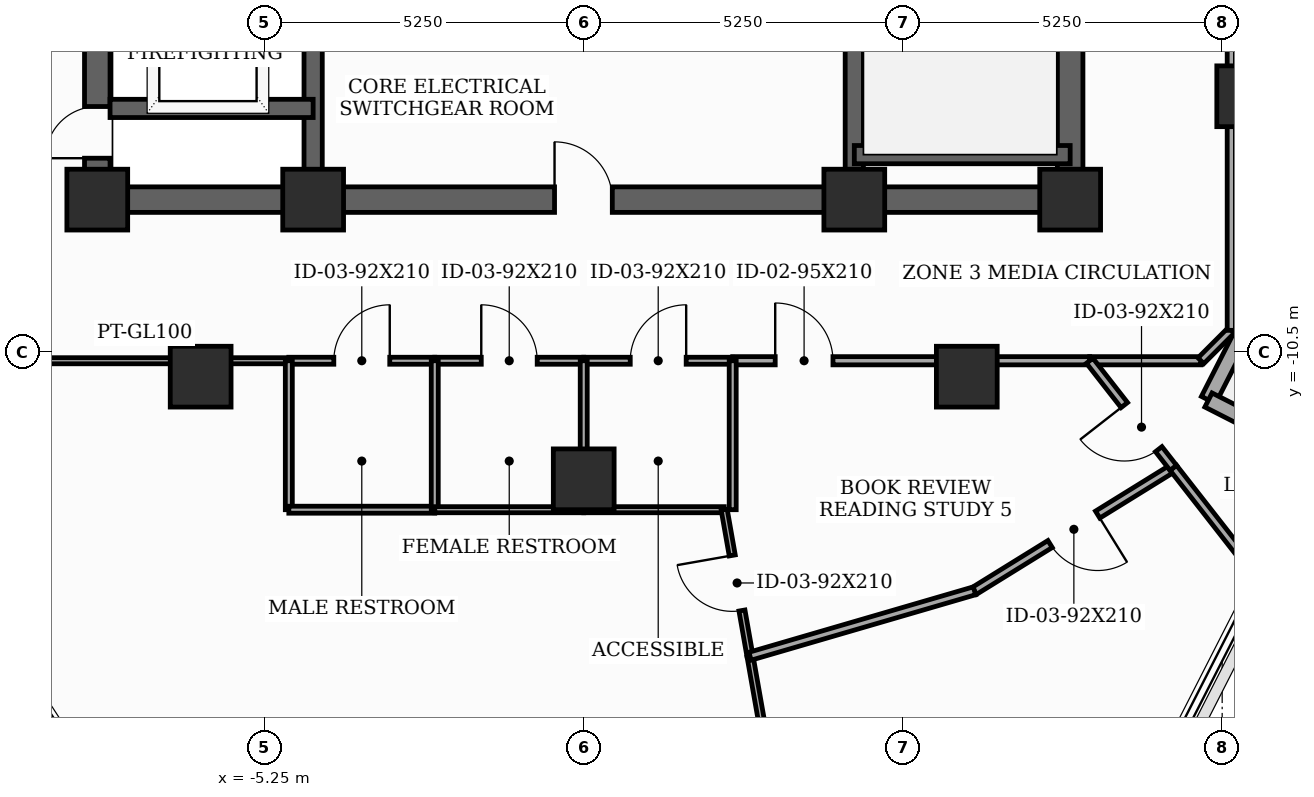
"""IFC4 building model, lengths in metres.
Left out: names, types, materials, properties, quantities, classifications, styles, units other than length and angle.
Written with IfcOpenShell. Run it as: python <this file> out.ifc"""

import sys

from ifc_helpers import new_model, si_unit, direction, frame, frame_2d, origin, origin_2d, place, context, subcontext, project, spatial, rectangle, extrude, element, fill, save


model = new_model("IFC4")
c1 = context("Model", 3, precision=1e-05, world=origin(), true_north=direction((0.0, 1.0)))
c2 = subcontext(c1, "Body", "Model", "MODEL_VIEW")
j1 = project(units=[si_unit("LENGTHUNIT", "METRE"), si_unit("PLANEANGLEUNIT", "RADIAN")], contexts=[c1])
p1 = place(None, origin())
s1 = spatial("IfcSite", under=j1, at=p1, CompositionType="ELEMENT")
p2 = place(p1, origin())
s2 = spatial("IfcBuilding", under=s1, at=p2, CompositionType="ELEMENT")
p3 = place(p2, frame((0.0, 0.0, 252.2)))
s3 = spatial("IfcBuildingStorey", under=s2, at=p3, CompositionType="ELEMENT", Elevation=252.2)
for number, where, z_axis, x_axis in (
    (1, (-8.0, -8.0, 0.0), (0.0, 0.0, 1.0), (1.0, 0.0, 0.0)),
    (2, (-4.45, -8.0, 0.0), (0.0, 0.0, 1.0), (1.0, 0.0, 0.0)),
    (3, (4.45, -8.0, 0.0), (0.0, 0.0, 1.0), (1.0, 0.0, 0.0)),
    (4, (8.0, -8.0, 0.0), (0.0, 0.0, 1.0), (1.0, 0.0, 0.0)),
    (5, (-6.3, -10.912, 0.0), (0.0, 0.0, 1.0), (1.0, 0.0, 0.0)),
    (6, (0.0, -12.6, 0.0), (0.0, 0.0, 1.0), (1.0, 0.0, 0.0)),
    (7, (6.3, -10.912, 0.0), (0.0, 0.0, 1.0), (1.0, 0.0, 0.0)),
    (8, (10.912, -6.3, 0.0), (0.0, 0.0, 1.0), (1.0, 0.0, 0.0)),
):
    element("IfcColumn", number, at=place(p3, frame(where, z_axis=z_axis, x_axis=x_axis)), inside=s3, PredefinedType="COLUMN", context=c2, shape_type="SweptSolid", body=[
        extrude(rectangle(XDim=1.0, YDim=1.0, at=origin_2d()), origin(), (0.0, 0.0, 1.0), 3.7),
    ])
p4 = place(p3, frame((10.274, -11.296, 0.0), z_axis=(0.0, 0.0, 1.0), x_axis=(0.453991476178, 0.891006026667, 0.0)))
e9 = element("IfcWall", 9, at=p4, inside=s3, PredefinedType="SOLIDWALL", context=c2, shape_type="SweptSolid", body=[
    extrude(rectangle(XDim=10.8, YDim=0.26, at=frame_2d((5.4, 0.0))), origin(), (0.0, 0.0, 1.0), 3.5),
])
p5 = place(p4, frame((3.2, 0.0, 0.0)))
e10 = element("IfcOpeningElement", 10, at=p5, cuts=e9, PredefinedType="OPENING", context=c2, shape_type="SweptSolid", body=[
    extrude(rectangle(XDim=1.6, YDim=2.08, at=frame_2d((0.8, 1.04))), frame((0.0, 0.14, 0.0), z_axis=(0.0, -1.0, 0.0), x_axis=(1.0, 0.0, 0.0)), (0.0, 0.0, 1.0), 0.28),
])
p6 = place(p4, frame((5.65, 0.0, 0.85)))
e11 = element("IfcOpeningElement", 11, at=p6, cuts=e9, PredefinedType="OPENING", context=c2, shape_type="SweptSolid", body=[
    extrude(rectangle(XDim=1.3, YDim=1.25, at=frame_2d((0.65, 0.625))), frame((0.0, 0.14, 0.0), z_axis=(0.0, -1.0, 0.0), x_axis=(1.0, 0.0, 0.0)), (0.0, 0.0, 1.0), 0.28),
])
p7 = place(p3, frame((12.19, -12.272, 0.0), z_axis=(0.0, 0.0, 1.0), x_axis=(-0.890994427822, 0.454014239413, 0.0)))
e12 = element("IfcWall", 12, at=p7, inside=s3, PredefinedType="SOLIDWALL", context=c2, shape_type="SweptSolid", body=[
    extrude(rectangle(XDim=2.15, YDim=0.26, at=frame_2d((1.075, 0.0))), origin(), (0.0, 0.0, 1.0), 3.5),
])
p8 = place(p3, frame((-8.0, -8.0, 0.0), z_axis=(0.0, 0.0, 1.0), x_axis=(0.0, 1.0, 0.0)))
e13 = element("IfcWall", 13, at=p8, inside=s3, PredefinedType="SHEAR", context=c2, shape_type="SweptSolid", body=[
    extrude(rectangle(XDim=16.0, YDim=0.42, at=frame_2d((8.0, 0.0))), origin(), (0.0, 0.0, 1.0), 3.5),
])
p9 = place(p8, frame((0.681, 0.0, 0.0)))
e14 = element("IfcOpeningElement", 14, at=p9, cuts=e13, PredefinedType="OPENING", context=c2, shape_type="SweptSolid", body=[
    extrude(rectangle(XDim=0.85, YDim=2.02, at=frame_2d((0.425, 1.01))), frame((0.0, 0.22, 0.0), z_axis=(0.0, -1.0, 0.0), x_axis=(1.0, 0.0, 0.0)), (0.0, 0.0, 1.0), 0.44),
])
p10 = place(p8, frame((5.35, 0.0, 0.0)))
e15 = element("IfcOpeningElement", 15, at=p10, cuts=e13, PredefinedType="OPENING", context=c2, shape_type="SweptSolid", body=[
    extrude(rectangle(XDim=1.05, YDim=2.15, at=frame_2d((0.525, 1.075))), frame((0.0, 0.22, 0.0), z_axis=(0.0, -1.0, 0.0), x_axis=(1.0, 0.0, 0.0)), (0.0, 0.0, 1.0), 0.44),
])
p11 = place(p3, frame((8.0, -8.0, 0.0), z_axis=(0.0, 0.0, 1.0), x_axis=(0.0, 1.0, 0.0)))
e16 = element("IfcWall", 16, at=p11, inside=s3, PredefinedType="SHEAR", context=c2, shape_type="SweptSolid", body=[
    extrude(rectangle(XDim=16.0, YDim=0.42, at=frame_2d((8.0, 0.0))), origin(), (0.0, 0.0, 1.0), 3.5),
])
p12 = place(p11, frame((9.6, 0.0, 0.0)))
e17 = element("IfcOpeningElement", 17, at=p12, cuts=e16, PredefinedType="OPENING", context=c2, shape_type="SweptSolid", body=[
    extrude(rectangle(XDim=1.05, YDim=2.15, at=frame_2d((0.525, 1.075))), frame((0.0, 0.22, 0.0), z_axis=(0.0, -1.0, 0.0), x_axis=(1.0, 0.0, 0.0)), (0.0, 0.0, 1.0), 0.44),
])
p13 = place(p11, frame((14.469, 0.0, 0.0)))
e18 = element("IfcOpeningElement", 18, at=p13, cuts=e16, PredefinedType="OPENING", context=c2, shape_type="SweptSolid", body=[
    extrude(rectangle(XDim=0.85, YDim=2.02, at=frame_2d((0.425, 1.01))), frame((0.0, 0.22, 0.0), z_axis=(0.0, -1.0, 0.0), x_axis=(1.0, 0.0, 0.0)), (0.0, 0.0, 1.0), 0.44),
])
p14 = place(p3, frame((-8.0, -8.0, 0.0), z_axis=(0.0, 0.0, 1.0), x_axis=(1.0, 0.0, 0.0)))
e19 = element("IfcWall", 19, at=p14, inside=s3, PredefinedType="SHEAR", context=c2, shape_type="SweptSolid", body=[
    extrude(rectangle(XDim=16.0, YDim=0.42, at=frame_2d((8.0, 0.0))), origin(), (0.0, 0.0, 1.0), 3.5),
])
p15 = place(p14, frame((7.52, 0.0, 0.0)))
e20 = element("IfcOpeningElement", 20, at=p15, cuts=e19, PredefinedType="OPENING", context=c2, shape_type="SweptSolid", body=[
    extrude(rectangle(XDim=0.95, YDim=2.1, at=frame_2d((0.475, 1.05))), frame((0.0, 0.22, 0.0), z_axis=(0.0, -1.0, 0.0), x_axis=(1.0, 0.0, 0.0)), (0.0, 0.0, 1.0), 0.44),
])
for number, where, z_axis, x_axis in (
    (21, (-4.45, -7.79, 0.0), (0.0, 0.0, 1.0), (0.0, 1.0, 0.0)),
    (22, (4.45, -7.79, 0.0), (0.0, 0.0, 1.0), (0.0, 1.0, 0.0)),
):
    element("IfcWall", number, at=place(p3, frame(where, z_axis=z_axis, x_axis=x_axis)), inside=s3, PredefinedType="SHEAR", context=c2, shape_type="SweptSolid", body=[
        extrude(rectangle(XDim=15.58, YDim=0.3, at=frame_2d((7.79, 0.0))), origin(), (0.0, 0.0, 1.0), 3.5),
    ])
p16 = place(p3, frame((4.45, -7.26, 0.0), z_axis=(0.0, 0.0, 1.0), x_axis=(1.0, 0.0, 0.0)))
e23 = element("IfcWall", 23, at=p16, inside=s3, PredefinedType="SHEAR", context=c2, shape_type="SweptSolid", body=[
    extrude(rectangle(XDim=3.55, YDim=0.3, at=frame_2d((1.775, 0.0))), origin(), (0.0, 0.0, 1.0), 3.5),
])
p17 = place(p3, frame((-7.79, -6.5, 0.0), z_axis=(0.0, 0.0, 1.0), x_axis=(1.0, 0.0, 0.0)))
e24 = element("IfcWall", 24, at=p17, inside=s3, PredefinedType="SHEAR", context=c2, shape_type="SweptSolid", body=[
    extrude(rectangle(XDim=3.34, YDim=0.3, at=frame_2d((1.67, 0.0))), origin(), (0.0, 0.0, 1.0), 3.5),
])
p18 = place(p3, frame((-4.85, -10.65, 0.0), z_axis=(0.0, 0.0, 1.0), x_axis=(1.0, 0.0, 0.0)))
e25 = element("IfcWall", 25, at=p18, inside=s3, PredefinedType="PARTITIONING", context=c2, shape_type="SweptSolid", body=[
    extrude(rectangle(XDim=2.4, YDim=0.115, at=frame_2d((1.2, 0.0))), origin(), (0.0, 0.0, 1.0), 3.5),
])
p19 = place(p18, frame((0.74, 0.0, 0.0)))
e26 = element("IfcOpeningElement", 26, at=p19, cuts=e25, PredefinedType="OPENING", context=c2, shape_type="SweptSolid", body=[
    extrude(rectangle(XDim=0.92, YDim=2.1, at=frame_2d((0.46, 1.05))), frame((0.0, 0.067, 0.0), z_axis=(0.0, -1.0, 0.0), x_axis=(1.0, 0.0, 0.0)), (0.0, 0.0, 1.0), 0.135),
])
p20 = place(p3, frame((-9.589, -10.65, 0.0), z_axis=(0.0, 0.0, 1.0), x_axis=(1.0, 0.0, 0.0)))
e27 = element("IfcWall", 27, at=p20, inside=s3, PredefinedType="MOVABLE", context=c2, shape_type="SweptSolid", body=[
    extrude(rectangle(XDim=4.739, YDim=0.1, at=frame_2d((2.37, 0.0))), origin(), (0.0, 0.0, 1.0), 2.885),
])
p21 = place(p3, frame((-2.45, -10.65, 0.0), z_axis=(0.0, 0.0, 1.0), x_axis=(1.0, 0.0, 0.0)))
e28 = element("IfcWall", 28, at=p21, inside=s3, PredefinedType="PARTITIONING", context=c2, shape_type="SweptSolid", body=[
    extrude(rectangle(XDim=2.45, YDim=0.115, at=frame_2d((1.225, 0.0))), origin(), (0.0, 0.0, 1.0), 2.885),
])
p22 = place(p21, frame((0.765, 0.0, 0.0)))
e29 = element("IfcOpeningElement", 29, at=p22, cuts=e28, PredefinedType="OPENING", context=c2, shape_type="SweptSolid", body=[
    extrude(rectangle(XDim=0.92, YDim=2.1, at=frame_2d((0.46, 1.05))), frame((0.0, 0.067, 0.0), z_axis=(0.0, -1.0, 0.0), x_axis=(1.0, 0.0, 0.0)), (0.0, 0.0, 1.0), 0.135),
])
p23 = place(p3, frame((0.0, -10.65, 0.0), z_axis=(0.0, 0.0, 1.0), x_axis=(1.0, 0.0, 0.0)))
e30 = element("IfcWall", 30, at=p23, inside=s3, PredefinedType="PARTITIONING", context=c2, shape_type="SweptSolid", body=[
    extrude(rectangle(XDim=2.45, YDim=0.115, at=frame_2d((1.225, 0.0))), origin(), (0.0, 0.0, 1.0), 3.5),
])
p24 = place(p23, frame((0.765, 0.0, 0.0)))
e31 = element("IfcOpeningElement", 31, at=p24, cuts=e30, PredefinedType="OPENING", context=c2, shape_type="SweptSolid", body=[
    extrude(rectangle(XDim=0.92, YDim=2.1, at=frame_2d((0.46, 1.05))), frame((0.0, 0.067, 0.0), z_axis=(0.0, -1.0, 0.0), x_axis=(1.0, 0.0, 0.0)), (0.0, 0.0, 1.0), 0.135),
])
p25 = place(p3, frame((2.45, -10.65, 0.0), z_axis=(0.0, 0.0, 1.0), x_axis=(1.0, 0.0, 0.0)))
e32 = element("IfcWall", 32, at=p25, inside=s3, PredefinedType="PARTITIONING", context=c2, shape_type="SweptSolid", body=[
    extrude(rectangle(XDim=5.871, YDim=0.135, at=frame_2d((2.936, 0.0))), origin(), (0.0, 0.0, 1.0), 2.885),
])
p26 = place(p25, frame((0.699, 0.0, 0.0)))
e33 = element("IfcOpeningElement", 33, at=p26, cuts=e32, PredefinedType="OPENING", context=c2, shape_type="SweptSolid", body=[
    extrude(rectangle(XDim=0.95, YDim=2.1, at=frame_2d((0.475, 1.05))), frame((0.0, 0.077, 0.0), z_axis=(0.0, -1.0, 0.0), x_axis=(1.0, 0.0, 0.0)), (0.0, 0.0, 1.0), 0.155),
])
p27 = place(p3, frame((8.321, -10.65, 0.0), z_axis=(0.0, 0.0, 1.0), x_axis=(1.0, 0.0, 0.0)))
e34 = element("IfcWall", 34, at=p27, inside=s3, PredefinedType="PARTITIONING", context=c2, shape_type="SweptSolid", body=[
    extrude(rectangle(XDim=1.829, YDim=0.135, at=frame_2d((0.915, 0.0))), origin(), (0.0, 0.0, 1.0), 3.5),
])
p28 = place(p3, frame((10.15, -10.65, 0.0), z_axis=(0.0, 0.0, 1.0), x_axis=(0.707106781187, 0.707106781187, 0.0)))
e35 = element("IfcWall", 35, at=p28, inside=s3, PredefinedType="PARTITIONING", context=c2, shape_type="SweptSolid", body=[
    extrude(rectangle(XDim=0.707, YDim=0.135, at=frame_2d((0.354, 0.0))), origin(), (0.0, 0.0, 1.0), 3.5),
])
p29 = place(p3, frame((10.65, -10.15, 0.0), z_axis=(0.0, 0.0, 1.0), x_axis=(0.0, 1.0, 0.0)))
e36 = element("IfcWall", 36, at=p29, inside=s3, PredefinedType="PARTITIONING", context=c2, shape_type="SweptSolid", body=[
    extrude(rectangle(XDim=5.408, YDim=0.135, at=frame_2d((2.704, 0.0))), origin(), (0.0, 0.0, 1.0), 2.885),
])
p30 = place(p3, frame((10.65, -4.742, 0.0), z_axis=(0.0, 0.0, 1.0), x_axis=(0.913666216357, -0.406465306131, 0.0)))
e37 = element("IfcWall", 37, at=p30, inside=s3, PredefinedType="PARTITIONING", context=c2, shape_type="SweptSolid", body=[
    extrude(rectangle(XDim=2.564, YDim=0.135, at=frame_2d((1.282, 0.0))), origin(), (0.0, 0.0, 1.0), 2.885),
])
p31 = place(p3, frame((-4.85, -10.65, 0.0), z_axis=(0.0, 0.0, 1.0), x_axis=(0.0, -1.0, 0.0)))
e38 = element("IfcWall", 38, at=p31, inside=s3, PredefinedType="PARTITIONING", context=c2, shape_type="SweptSolid", body=[
    extrude(rectangle(XDim=2.45, YDim=0.115, at=frame_2d((1.225, 0.0))), origin(), (0.0, 0.0, 1.0), 2.885),
])
p32 = place(p3, frame((-4.85, -13.1, 0.0), z_axis=(0.0, 0.0, 1.0), x_axis=(1.0, 0.0, 0.0)))
e39 = element("IfcWall", 39, at=p32, inside=s3, PredefinedType="PARTITIONING", context=c2, shape_type="SweptSolid", body=[
    extrude(rectangle(XDim=2.4, YDim=0.115, at=frame_2d((1.2, 0.0))), origin(), (0.0, 0.0, 1.0), 3.5),
])
p33 = place(p3, frame((-2.45, -13.1, 0.0), z_axis=(0.0, 0.0, 1.0), x_axis=(0.0, 1.0, 0.0)))
e40 = element("IfcWall", 40, at=p33, inside=s3, PredefinedType="PARTITIONING", context=c2, shape_type="SweptSolid", body=[
    extrude(rectangle(XDim=2.45, YDim=0.115, at=frame_2d((1.225, 0.0))), origin(), (0.0, 0.0, 1.0), 2.885),
])
p34 = place(p3, frame((0.0, -13.1, 0.0), z_axis=(0.0, 0.0, 1.0), x_axis=(-1.0, 0.0, 0.0)))
e41 = element("IfcWall", 41, at=p34, inside=s3, PredefinedType="MOVABLE", context=c2, shape_type="SweptSolid", body=[
    extrude(rectangle(XDim=2.45, YDim=0.1, at=frame_2d((1.225, 0.0))), origin(), (0.0, 0.0, 1.0), 3.5),
])
p35 = place(p3, frame((2.31, -13.1, 0.0), z_axis=(0.0, 0.0, 1.0), x_axis=(-1.0, 0.0, 0.0)))
e42 = element("IfcWall", 42, at=p35, inside=s3, PredefinedType="MOVABLE", context=c2, shape_type="SweptSolid", body=[
    extrude(rectangle(XDim=2.31, YDim=0.1, at=frame_2d((1.155, 0.0))), origin(), (0.0, 0.0, 1.0), 3.5),
])
p36 = place(p3, frame((4.719, -26.759, 0.0), z_axis=(0.0, 0.0, 1.0), x_axis=(-0.173635361328, 0.984810012793, 0.0)))
e43 = element("IfcWall", 43, at=p36, inside=s3, PredefinedType="MOVABLE", context=c2, shape_type="SweptSolid", body=[
    extrude(rectangle(XDim=11.423, YDim=0.1, at=frame_2d((5.711, 0.0))), origin(), (0.0, 0.0, 1.0), 3.035),
])
p37 = place(p3, frame((2.735, -15.51, 0.0), z_axis=(0.0, 0.0, 1.0), x_axis=(-0.173694270709, 0.984799624453, 0.0)))
e44 = element("IfcWall", 44, at=p37, inside=s3, PredefinedType="MOVABLE", context=c2, shape_type="SweptSolid", body=[
    extrude(rectangle(XDim=2.447, YDim=0.1, at=frame_2d((1.224, 0.0))), origin(), (0.0, 0.0, 1.0), 3.185),
])
p38 = place(p37, frame((0.764, 0.0, 0.0)))
e45 = element("IfcOpeningElement", 45, at=p38, cuts=e44, PredefinedType="OPENING", context=c2, shape_type="SweptSolid", body=[
    extrude(rectangle(XDim=0.92, YDim=2.1, at=frame_2d((0.46, 1.05))), frame((0.0, 0.06, 0.0), z_axis=(0.0, -1.0, 0.0), x_axis=(1.0, 0.0, 0.0)), (0.0, 0.0, 1.0), 0.12),
])
for number, where, z_axis, x_axis in (
    (46, (0.0, -13.1, 0.0), (0.0, 0.0, 1.0), (0.0, 1.0, 0.0)),
    (47, (2.45, -13.1, 0.0), (0.0, 0.0, 1.0), (0.0, 1.0, 0.0)),
):
    element("IfcWall", number, at=place(p3, frame(where, z_axis=z_axis, x_axis=x_axis)), inside=s3, PredefinedType="PARTITIONING", context=c2, shape_type="SweptSolid", body=[
        extrude(rectangle(XDim=2.45, YDim=0.115, at=frame_2d((1.225, 0.0))), origin(), (0.0, 0.0, 1.0), 2.885),
    ])
p39 = place(p3, frame((9.696, -12.411, 0.0), z_axis=(0.0, 0.0, 1.0), x_axis=(-0.850393663863, -0.526146953295, 0.0)))
e48 = element("IfcWall", 48, at=p39, inside=s3, PredefinedType="PARTITIONING", context=c2, shape_type="SweptSolid", body=[
    extrude(rectangle(XDim=3.845, YDim=0.135, at=frame_2d((1.923, 0.0))), origin(), (0.0, 0.0, 1.0), 3.035),
])
p40 = place(p39, frame((1.463, 0.0, 0.0)))
e49 = element("IfcOpeningElement", 49, at=p40, cuts=e48, PredefinedType="OPENING", context=c2, shape_type="SweptSolid", body=[
    extrude(rectangle(XDim=0.92, YDim=2.1, at=frame_2d((0.46, 1.05))), frame((0.0, 0.077, 0.0), z_axis=(0.0, -1.0, 0.0), x_axis=(1.0, 0.0, 0.0)), (0.0, 0.0, 1.0), 0.155),
])
p41 = place(p3, frame((6.426, -14.434, 0.0), z_axis=(0.0, 0.0, 1.0), x_axis=(-0.960041241254, -0.279858562654, 0.0)))
e50 = element("IfcWall", 50, at=p41, inside=s3, PredefinedType="PARTITIONING", context=c2, shape_type="SweptSolid", body=[
    extrude(rectangle(XDim=3.844, YDim=0.135, at=frame_2d((1.922, 0.0))), origin(), (0.0, 0.0, 1.0), 3.185),
])
p42 = place(p3, frame((11.108, -14.218, 0.0), z_axis=(0.0, 0.0, 1.0), x_axis=(-0.615736984334, 0.787951753677, 0.0)))
e51 = element("IfcWall", 51, at=p42, inside=s3, PredefinedType="PARTITIONING", context=c2, shape_type="SweptSolid", body=[
    extrude(rectangle(XDim=2.294, YDim=0.135, at=frame_2d((1.147, 0.0))), origin(), (0.0, 0.0, 1.0), 3.035),
])
p43 = place(p3, frame((9.696, -12.411, 0.0), z_axis=(0.0, 0.0, 1.0), x_axis=(-0.615429845305, 0.788191668002, 0.0)))
e52 = element("IfcWall", 52, at=p43, inside=s3, PredefinedType="PARTITIONING", context=c2, shape_type="SweptSolid", body=[
    extrude(rectangle(XDim=2.234, YDim=0.135, at=frame_2d((1.117, 0.0))), origin(), (0.0, 0.0, 1.0), 3.5),
])
p44 = place(p43, frame((0.389, 0.0, 0.0)))
e53 = element("IfcOpeningElement", 53, at=p44, cuts=e52, PredefinedType="OPENING", context=c2, shape_type="SweptSolid", body=[
    extrude(rectangle(XDim=0.92, YDim=2.1, at=frame_2d((0.46, 1.05))), frame((0.0, 0.077, 0.0), z_axis=(0.0, -1.0, 0.0), x_axis=(1.0, 0.0, 0.0)), (0.0, 0.0, 1.0), 0.155),
])
p45 = place(p9, origin())
e54 = element("IfcDoor", 54, at=p45, inside=s3, OperationType="SINGLE_SWING_LEFT", PredefinedType="TRAPDOOR", context=c2, shape_type="SweptSolid", body=[
    extrude(rectangle(XDim=0.85, YDim=2.02, at=frame_2d((0.425, 1.01))), frame((0.0, 0.025, 0.0), z_axis=(0.0, -1.0, 0.0), x_axis=(1.0, 0.0, 0.0)), (0.0, 0.0, 1.0), 0.05),
])
fill(e14, e54)
p46 = place(p15, origin())
e55 = element("IfcDoor", 55, at=p46, inside=s3, OperationType="SINGLE_SWING_LEFT", PredefinedType="DOOR", context=c2, shape_type="SweptSolid", body=[
    extrude(rectangle(XDim=0.95, YDim=2.1, at=frame_2d((0.475, 1.05))), frame((0.0, 0.025, 0.0), z_axis=(0.0, -1.0, 0.0), x_axis=(1.0, 0.0, 0.0)), (0.0, 0.0, 1.0), 0.05),
])
fill(e20, e55)
p47 = place(p19, origin())
e56 = element("IfcDoor", 56, at=p47, inside=s3, OperationType="SINGLE_SWING_RIGHT", PredefinedType="DOOR", context=c2, shape_type="SweptSolid", body=[
    extrude(rectangle(XDim=0.92, YDim=2.1, at=frame_2d((0.46, 1.05))), frame((0.0, 0.025, 0.0), z_axis=(0.0, -1.0, 0.0), x_axis=(1.0, 0.0, 0.0)), (0.0, 0.0, 1.0), 0.05),
])
fill(e26, e56)
p48 = place(p22, origin())
e57 = element("IfcDoor", 57, at=p48, inside=s3, OperationType="SINGLE_SWING_LEFT", PredefinedType="DOOR", context=c2, shape_type="SweptSolid", body=[
    extrude(rectangle(XDim=0.92, YDim=2.1, at=frame_2d((0.46, 1.05))), frame((0.0, 0.025, 0.0), z_axis=(0.0, -1.0, 0.0), x_axis=(1.0, 0.0, 0.0)), (0.0, 0.0, 1.0), 0.05),
])
fill(e29, e57)
p49 = place(p24, origin())
e58 = element("IfcDoor", 58, at=p49, inside=s3, OperationType="SINGLE_SWING_RIGHT", PredefinedType="DOOR", context=c2, shape_type="SweptSolid", body=[
    extrude(rectangle(XDim=0.92, YDim=2.1, at=frame_2d((0.46, 1.05))), frame((0.0, 0.025, 0.0), z_axis=(0.0, -1.0, 0.0), x_axis=(1.0, 0.0, 0.0)), (0.0, 0.0, 1.0), 0.05),
])
fill(e31, e58)
p50 = place(p26, origin())
e59 = element("IfcDoor", 59, at=p50, inside=s3, OperationType="SINGLE_SWING_LEFT", PredefinedType="DOOR", context=c2, shape_type="SweptSolid", body=[
    extrude(rectangle(XDim=0.95, YDim=2.1, at=frame_2d((0.475, 1.05))), frame((0.0, 0.025, 0.0), z_axis=(0.0, -1.0, 0.0), x_axis=(1.0, 0.0, 0.0)), (0.0, 0.0, 1.0), 0.05),
])
fill(e33, e59)
p51 = place(p38, origin())
e60 = element("IfcDoor", 60, at=p51, inside=s3, OperationType="SINGLE_SWING_RIGHT", PredefinedType="DOOR", context=c2, shape_type="SweptSolid", body=[
    extrude(rectangle(XDim=0.92, YDim=2.1, at=frame_2d((0.46, 1.05))), frame((0.0, 0.025, 0.0), z_axis=(0.0, -1.0, 0.0), x_axis=(1.0, 0.0, 0.0)), (0.0, 0.0, 1.0), 0.05),
])
fill(e45, e60)
p52 = place(p40, origin())
e61 = element("IfcDoor", 61, at=p52, inside=s3, OperationType="SINGLE_SWING_LEFT", PredefinedType="DOOR", context=c2, shape_type="SweptSolid", body=[
    extrude(rectangle(XDim=0.92, YDim=2.1, at=frame_2d((0.46, 1.05))), frame((0.0, 0.025, 0.0), z_axis=(0.0, -1.0, 0.0), x_axis=(1.0, 0.0, 0.0)), (0.0, 0.0, 1.0), 0.05),
])
fill(e49, e61)
p53 = place(p44, origin())
e62 = element("IfcDoor", 62, at=p53, inside=s3, OperationType="SINGLE_SWING_RIGHT", PredefinedType="DOOR", context=c2, shape_type="SweptSolid", body=[
    extrude(rectangle(XDim=0.92, YDim=2.1, at=frame_2d((0.46, 1.05))), frame((0.0, 0.025, 0.0), z_axis=(0.0, -1.0, 0.0), x_axis=(1.0, 0.0, 0.0)), (0.0, 0.0, 1.0), 0.05),
])
fill(e53, e62)
save(model, sys.argv[1])
